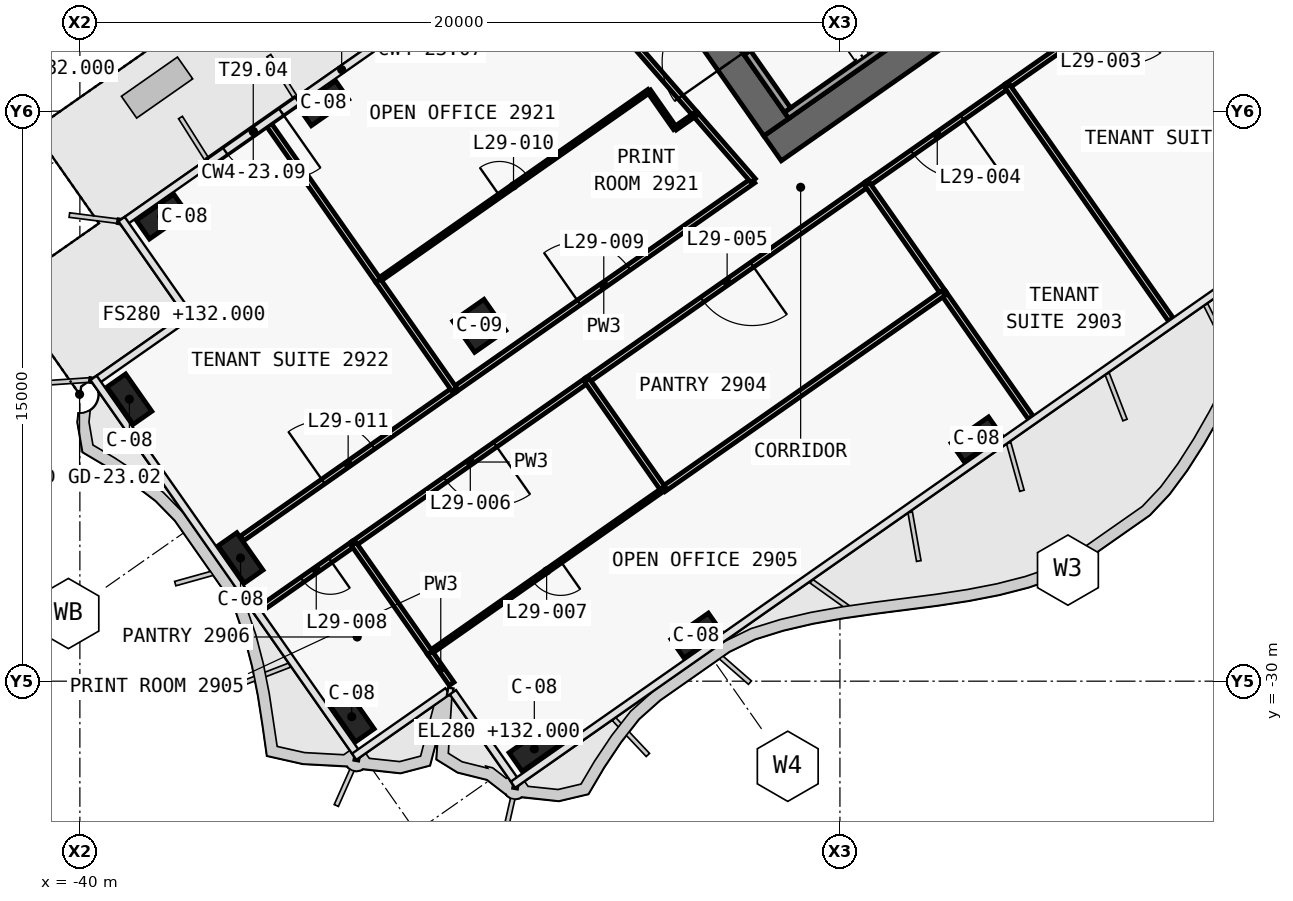
"""IFC4 building model, lengths in metres.
Left out: names, types, materials, properties, quantities, classifications, styles, units other than length and angle.
Written with IfcOpenShell. Run it as: python <this file> out.ifc"""

import sys

from ifc_helpers import new_model, si_unit, direction, frame, frame_2d, origin, origin_2d, place, context, subcontext, project, spatial, polyline, rectangle, outline, extrude, element, fill, save


model = new_model("IFC4")
c1 = context("Model", 3, precision=1e-05, world=origin(), true_north=direction((0.0, 1.0)))
c2 = subcontext(c1, "Body", "Model", "MODEL_VIEW")
j1 = project(units=[si_unit("LENGTHUNIT", "METRE"), si_unit("PLANEANGLEUNIT", "RADIAN")], contexts=[c1])
p1 = place(None, origin())
s1 = spatial("IfcSite", under=j1, at=p1, CompositionType="ELEMENT")
p2 = place(p1, origin())
s2 = spatial("IfcBuilding", under=s1, at=p2, CompositionType="ELEMENT")
p3 = place(p2, frame((0.0, 0.0, 132.0)))
s3 = spatial("IfcBuildingStorey", under=s2, at=p3, CompositionType="ELEMENT", Elevation=132.0)
p4 = place(p3, frame((0.029, -0.712, 0.0), z_axis=(0.0, 0.0, 1.0), x_axis=(-0.819151758019, -0.573576845187, 0.0)))
e1 = element("IfcWall", 1, at=p4, inside=s3, PredefinedType="SHEAR", context=c2, shape_type="SweptSolid", body=[
    extrude(outline(polyline([(26.616, 0.4), (0.56, 0.4), (-0.0, -0.4), (26.616, -0.4), (26.616, 0.4)])), origin(), (0.0, 0.0, 1.0), 3.9),
])
p5 = place(p4, frame((2.966, 0.0, 0.0)))
e2 = element("IfcOpeningElement", 2, at=p5, cuts=e1, PredefinedType="OPENING", context=c2, shape_type="SweptSolid", body=[
    extrude(rectangle(XDim=2.4, YDim=2.1, at=frame_2d((1.2, 1.05))), frame((0.0, 0.41, 0.0), z_axis=(0.0, -1.0, 0.0), x_axis=(1.0, 0.0, 0.0)), (0.0, 0.0, 1.0), 0.82),
])
p6 = place(p4, frame((11.916, 0.0, 0.0)))
e3 = element("IfcOpeningElement", 3, at=p6, cuts=e1, PredefinedType="OPENING", context=c2, shape_type="SweptSolid", body=[
    extrude(rectangle(XDim=2.4, YDim=2.1, at=frame_2d((1.2, 1.05))), frame((0.0, 0.41, 0.0), z_axis=(0.0, -1.0, 0.0), x_axis=(1.0, 0.0, 0.0)), (0.0, 0.0, 1.0), 0.82),
])
p7 = place(p3, frame((-21.675, -15.421, 0.0), z_axis=(0.0, 0.0, 1.0), x_axis=(-0.573581815061, 0.819148278049, 0.0)))
e4 = element("IfcWall", 4, at=p7, inside=s3, PredefinedType="SHEAR", context=c2, shape_type="SweptSolid", body=[
    extrude(outline(polyline([(0.0, 0.4), (0.0, -0.4), (9.6, -0.4), (9.6, 0.4), (0.0, 0.4)])), origin(), (0.0, 0.0, 1.0), 3.9),
])
p8 = place(p7, frame((6.3, 0.0, 0.0)))
e5 = element("IfcOpeningElement", 5, at=p8, cuts=e4, PredefinedType="OPENING", context=c2, shape_type="SweptSolid", body=[
    extrude(rectangle(XDim=1.8, YDim=2.1, at=frame_2d((0.9, 1.05))), frame((0.0, 0.41, 0.0), z_axis=(0.0, -1.0, 0.0), x_axis=(1.0, 0.0, 0.0)), (0.0, 0.0, 1.0), 0.82),
])
p9 = place(p7, frame((2.1, 0.0, 0.0)))
e6 = element("IfcOpeningElement", 6, at=p9, cuts=e4, PredefinedType="OPENING", context=c2, shape_type="SweptSolid", body=[
    extrude(rectangle(XDim=1.8, YDim=2.1, at=frame_2d((0.9, 1.05))), frame((0.0, 0.41, 0.0), z_axis=(0.0, -1.0, 0.0), x_axis=(1.0, 0.0, 0.0)), (0.0, 0.0, 1.0), 0.82),
])
for number, where, z_axis, x_axis in (
    (7, (-16.41, -23.637, 0.0), (0.0, 0.0, 1.0), (-0.819, -0.574, 0.0)),
    (8, (-23.782, -28.799, 0.0), (0.0, 0.0, 1.0), (-0.819, -0.574, 0.0)),
    (9, (-28.042, -31.782, 0.0), (0.0, 0.0, 1.0), (-0.819, -0.574, 0.0)),
    (10, (-33.591, -14.792, 0.0), (0.0, 0.0, 1.0), (-0.819, -0.574, 0.0)),
    (11, (-37.85, -17.774, 0.0), (0.0, 0.0, 1.0), (-0.819, -0.574, 0.0)),
    (12, (-32.847, -30.935, 0.0), (0.0, 0.0, 1.0), (-0.574, 0.819, 0.0)),
    (13, (-35.772, -26.757, 0.0), (0.0, 0.0, 1.0), (-0.574, 0.819, 0.0)),
    (14, (-38.698, -22.579, 0.0), (0.0, 0.0, 1.0), (-0.574, 0.819, 0.0)),
):
    element("IfcColumn", number, at=place(p3, frame(where, z_axis=z_axis, x_axis=x_axis)), inside=s3, PredefinedType="COLUMN", context=c2, shape_type="SweptSolid", body=[
        extrude(rectangle(XDim=1.2, YDim=0.6, at=origin_2d()), origin(), (0.0, 0.0, 1.0), 3.9),
    ])
p10 = place(p3, frame((-29.49, -20.649, 0.0), z_axis=(0.0, 0.0, 1.0), x_axis=(-0.819152044289, -0.573576436351, 0.0)))
e15 = element("IfcColumn", 15, at=p10, inside=s3, PredefinedType="COLUMN", context=c2, shape_type="SweptSolid", body=[
    extrude(rectangle(XDim=1.0, YDim=1.0, at=origin_2d()), origin(), (0.0, 0.0, 1.0), 3.9),
])
p11 = place(p3, frame((-14.851, -10.521, 0.0), z_axis=(0.0, 0.0, 1.0), x_axis=(-0.819141584393, -0.57359137434, 0.0)))
e16 = element("IfcWall", 16, at=p11, inside=s3, PredefinedType="SOLIDWALL", context=c2, shape_type="SweptSolid", body=[
    extrude(rectangle(XDim=8.0, YDim=0.2, at=frame_2d((4.0, 0.0))), origin(), (0.0, 0.0, 1.0), 3.62),
])
p12 = place(p3, frame((-21.38, -14.97, 0.0), z_axis=(0.0, 0.0, 1.0), x_axis=(-0.573559770908, 0.819163713305, 0.0)))
e17 = element("IfcWall", 17, at=p12, inside=s3, PredefinedType="SOLIDWALL", context=c2, shape_type="SweptSolid", body=[
    extrude(rectangle(XDim=1.85, YDim=0.2, at=frame_2d((0.925, 0.0))), origin(), (0.0, 0.0, 1.0), 3.62),
])
p13 = place(p3, frame((-22.441, -13.455, 2.15), z_axis=(0.0, 0.0, 1.0), x_axis=(-0.573591692345, 0.819141361715, 0.0)))
e18 = element("IfcWall", 18, at=p13, inside=s3, PredefinedType="SOLIDWALL", context=c2, shape_type="SweptSolid", body=[
    extrude(rectangle(XDim=1.9, YDim=0.2, at=frame_2d((0.95, 0.0))), origin(), (0.0, 0.0, 1.0), 1.47),
])
p14 = place(p3, frame((-34.299, -14.739, 0.0), z_axis=(0.0, 0.0, 1.0), x_axis=(-0.81917415632, -0.573544855802, 0.0)))
e19 = element("IfcWall", 19, at=p14, inside=s3, PredefinedType="SOLIDWALL", context=c2, shape_type="SweptSolid", body=[
    extrude(rectangle(XDim=2.78, YDim=0.2, at=frame_2d((1.39, 0.0))), origin(), (0.0, 0.0, 1.0), 3.62),
])
p15 = place(p14, frame((0.49, 0.0, 0.0)))
e20 = element("IfcOpeningElement", 20, at=p15, cuts=e19, PredefinedType="OPENING", context=c2, shape_type="SweptSolid", body=[
    extrude(rectangle(XDim=1.8, YDim=2.4, at=frame_2d((0.9, 1.2))), frame((0.0, 0.11, 0.0), z_axis=(0.0, -1.0, 0.0), x_axis=(1.0, 0.0, 0.0)), (0.0, 0.0, 1.0), 0.22),
])
p16 = place(p3, frame((-30.146, -22.33, 0.0), z_axis=(0.0, 0.0, 1.0), x_axis=(0.819150657747, 0.573578416533, 0.0)))
e21 = element("IfcWall", 21, at=p16, inside=s3, PredefinedType="PARTITIONING", context=c2, shape_type="SweptSolid", body=[
    extrude(rectangle(XDim=9.599, YDim=0.15, at=frame_2d((4.799, 0.0))), origin(), (0.0, 0.0, 1.0), 3.0),
])
p17 = place(p16, frame((4.0, 0.0, 0.0)))
e22 = element("IfcOpeningElement", 22, at=p17, cuts=e21, PredefinedType="OPENING", context=c2, shape_type="SweptSolid", body=[
    extrude(rectangle(XDim=1.6, YDim=2.1, at=frame_2d((0.8, 1.05))), frame((0.0, 0.085, 0.0), z_axis=(0.0, -1.0, 0.0), x_axis=(1.0, 0.0, 0.0)), (0.0, 0.0, 1.0), 0.17),
])
p18 = place(p3, frame((-35.739, -26.247, 0.0), z_axis=(0.0, 0.0, 1.0), x_axis=(0.819149650018, 0.57357985571, 0.0)))
e23 = element("IfcWall", 23, at=p18, inside=s3, PredefinedType="PARTITIONING", context=c2, shape_type="SweptSolid", body=[
    extrude(rectangle(XDim=6.832, YDim=0.15, at=frame_2d((3.416, 0.0))), origin(), (0.0, 0.0, 1.0), 3.0),
])
p19 = place(p18, frame((2.616, 0.0, 0.0)))
e24 = element("IfcOpeningElement", 24, at=p19, cuts=e23, PredefinedType="OPENING", context=c2, shape_type="SweptSolid", body=[
    extrude(rectangle(XDim=1.6, YDim=2.1, at=frame_2d((0.8, 1.05))), frame((0.0, 0.085, 0.0), z_axis=(0.0, -1.0, 0.0), x_axis=(1.0, 0.0, 0.0)), (0.0, 0.0, 1.0), 0.17),
])
p20 = place(p3, frame((-10.68, -10.896, 0.0), z_axis=(0.0, 0.0, 1.0), x_axis=(-0.819145946981, -0.573585144111, 0.0)))
e25 = element("IfcWall", 25, at=p20, inside=s3, PredefinedType="PARTITIONING", context=c2, shape_type="SweptSolid", body=[
    extrude(rectangle(XDim=6.004, YDim=0.15, at=frame_2d((3.002, 0.0))), origin(), (0.0, 0.0, 1.0), 3.0),
])
p21 = place(p20, frame((2.202, 0.0, 0.0)))
e26 = element("IfcOpeningElement", 26, at=p21, cuts=e25, PredefinedType="OPENING", context=c2, shape_type="SweptSolid", body=[
    extrude(rectangle(XDim=1.6, YDim=2.1, at=frame_2d((0.8, 1.05))), frame((0.0, 0.085, 0.0), z_axis=(0.0, -1.0, 0.0), x_axis=(1.0, 0.0, 0.0)), (0.0, 0.0, 1.0), 0.17),
])
p22 = place(p3, frame((-15.594, -14.338, 0.0), z_axis=(0.0, 0.0, 1.0), x_axis=(-0.819165703328, -0.573556928727, 0.0)))
e27 = element("IfcWall", 27, at=p22, inside=s3, PredefinedType="PARTITIONING", context=c2, shape_type="SweptSolid", body=[
    extrude(rectangle(XDim=4.504, YDim=0.15, at=frame_2d((2.252, 0.0))), origin(), (0.0, 0.0, 1.0), 3.62),
])
p23 = place(p22, frame((1.452, 0.0, 0.0)))
e28 = element("IfcOpeningElement", 28, at=p23, cuts=e27, PredefinedType="OPENING", context=c2, shape_type="SweptSolid", body=[
    extrude(rectangle(XDim=1.6, YDim=2.1, at=frame_2d((0.8, 1.05))), frame((0.0, 0.085, 0.0), z_axis=(0.0, -1.0, 0.0), x_axis=(1.0, 0.0, 0.0)), (0.0, 0.0, 1.0), 0.17),
])
p24 = place(p3, frame((-19.281, -16.919, 0.0), z_axis=(0.0, 0.0, 1.0), x_axis=(-0.819151661297, -0.57357698332, 0.0)))
e29 = element("IfcWall", 29, at=p24, inside=s3, PredefinedType="PARTITIONING", context=c2, shape_type="SweptSolid", body=[
    extrude(rectangle(XDim=9.004, YDim=0.15, at=frame_2d((4.502, 0.0))), origin(), (0.0, 0.0, 1.0), 3.0),
])
p25 = place(p24, frame((3.702, 0.0, 0.0)))
e30 = element("IfcOpeningElement", 30, at=p25, cuts=e29, PredefinedType="OPENING", context=c2, shape_type="SweptSolid", body=[
    extrude(rectangle(XDim=1.6, YDim=2.1, at=frame_2d((0.8, 1.05))), frame((0.0, 0.085, 0.0), z_axis=(0.0, -1.0, 0.0), x_axis=(1.0, 0.0, 0.0)), (0.0, 0.0, 1.0), 0.17),
])
p26 = place(p3, frame((-26.653, -22.081, 0.0), z_axis=(0.0, 0.0, 1.0), x_axis=(-0.819149375276, -0.573580248078, 0.0)))
e31 = element("IfcWall", 31, at=p26, inside=s3, PredefinedType="PARTITIONING", context=c2, shape_type="SweptSolid", body=[
    extrude(rectangle(XDim=7.504, YDim=0.15, at=frame_2d((3.752, 0.0))), origin(), (0.0, 0.0, 1.0), 3.0),
])
p27 = place(p26, frame((2.952, 0.0, 0.0)))
e32 = element("IfcOpeningElement", 32, at=p27, cuts=e31, PredefinedType="OPENING", context=c2, shape_type="SweptSolid", body=[
    extrude(rectangle(XDim=1.6, YDim=2.1, at=frame_2d((0.8, 1.05))), frame((0.0, 0.085, 0.0), z_axis=(0.0, -1.0, 0.0), x_axis=(1.0, 0.0, 0.0)), (0.0, 0.0, 1.0), 0.17),
])
p28 = place(p3, frame((-32.797, -26.383, 0.0), z_axis=(0.0, 0.0, 1.0), x_axis=(-0.819197532854, -0.573511466464, 0.0)))
e33 = element("IfcWall", 33, at=p28, inside=s3, PredefinedType="PARTITIONING", context=c2, shape_type="SweptSolid", body=[
    extrude(rectangle(XDim=3.002, YDim=0.15, at=frame_2d((1.501, 0.0))), origin(), (0.0, 0.0, 1.0), 2.9),
])
p29 = place(p28, frame((0.751, 0.0, 0.0)))
e34 = element("IfcOpeningElement", 34, at=p29, cuts=e33, PredefinedType="OPENING", context=c2, shape_type="SweptSolid", body=[
    extrude(rectangle(XDim=0.9, YDim=2.1, at=frame_2d((0.45, 1.05))), frame((0.0, 0.085, 0.0), z_axis=(0.0, -1.0, 0.0), x_axis=(1.0, 0.0, 0.0)), (0.0, 0.0, 1.0), 0.17),
])
p30 = place(p3, frame((-23.802, -15.082, 0.0), z_axis=(0.0, 0.0, 1.0), x_axis=(-0.656784983898, 0.754077903751, 0.0)))
e35 = element("IfcWall", 35, at=p30, inside=s3, PredefinedType="PARTITIONING", context=c2, shape_type="SweptSolid", body=[
    extrude(rectangle(XDim=4.226, YDim=0.15, at=frame_2d((2.113, 0.0))), origin(), (0.0, 0.0, 1.0), 3.62),
])
p31 = place(p3, frame((-22.284, -16.826, 0.0), z_axis=(0.0, 0.0, 1.0), x_axis=(-0.656749820099, 0.754108529192, 0.0)))
e36 = element("IfcWall", 36, at=p31, inside=s3, PredefinedType="PARTITIONING", context=c2, shape_type="SweptSolid", body=[
    extrude(rectangle(XDim=2.317, YDim=0.15, at=frame_2d((1.159, 0.0))), origin(), (0.0, 0.0, 1.0), 3.0),
])
p32 = place(p3, frame((-24.337, -15.454, 0.0), z_axis=(0.0, 0.0, 1.0), x_axis=(0.819196675611, 0.573512690938, 0.0)))
e37 = element("IfcWall", 37, at=p32, inside=s3, PredefinedType="PARTITIONING", context=c2, shape_type="SweptSolid", body=[
    extrude(rectangle(XDim=0.651, YDim=0.1, at=frame_2d((0.325, 0.0))), origin(), (0.0, 0.0, 1.0), 3.62),
])
p33 = place(p3, frame((-25.026, -14.47, 0.0), z_axis=(0.0, 0.0, 1.0), x_axis=(0.57359875229, -0.819136418047, 0.0)))
e38 = element("IfcWall", 38, at=p33, inside=s3, PredefinedType="PARTITIONING", context=c2, shape_type="SweptSolid", body=[
    extrude(rectangle(XDim=1.201, YDim=0.1, at=frame_2d((0.601, 0.0))), origin(), (0.0, 0.0, 1.0), 3.62),
])
p34 = place(p3, frame((-32.153, -19.46, 0.0), z_axis=(0.0, 0.0, 1.0), x_axis=(0.819139624372, 0.573594173421, 0.0)))
e39 = element("IfcWall", 39, at=p34, inside=s3, PredefinedType="PARTITIONING", context=c2, shape_type="SweptSolid", body=[
    extrude(rectangle(XDim=8.7, YDim=0.1, at=frame_2d((4.35, 0.0))), origin(), (0.0, 0.0, 1.0), 3.0),
])
p35 = place(p34, frame((3.9, 0.0, 0.0)))
e40 = element("IfcOpeningElement", 40, at=p35, cuts=e39, PredefinedType="OPENING", context=c2, shape_type="SweptSolid", body=[
    extrude(rectangle(XDim=0.9, YDim=2.1, at=frame_2d((0.45, 1.05))), frame((0.0, 0.06, 0.0), z_axis=(0.0, -1.0, 0.0), x_axis=(1.0, 0.0, 0.0)), (0.0, 0.0, 1.0), 0.12),
])
p36 = place(p3, frame((-32.153, -19.46, 0.0), z_axis=(0.0, 0.0, 1.0), x_axis=(-0.573590165683, 0.819142430736, 0.0)))
e41 = element("IfcWall", 41, at=p36, inside=s3, PredefinedType="PARTITIONING", context=c2, shape_type="SweptSolid", body=[
    extrude(rectangle(XDim=4.999, YDim=0.15, at=frame_2d((2.5, 0.0))), origin(), (0.0, 0.0, 1.0), 2.9),
])
p37 = place(p3, frame((-30.145, -22.328, 0.0), z_axis=(0.0, 0.0, 1.0), x_axis=(-0.573565328398, 0.819159822049, 0.0)))
e42 = element("IfcWall", 42, at=p37, inside=s3, PredefinedType="PARTITIONING", context=c2, shape_type="SweptSolid", body=[
    extrude(rectangle(XDim=3.5, YDim=0.15, at=frame_2d((1.75, 0.0))), origin(), (0.0, 0.0, 1.0), 3.0),
])
p38 = place(p3, frame((-8.674, -13.764, 0.0), z_axis=(0.0, 0.0, 1.0), x_axis=(-0.573612130335, 0.819127049933, 0.0)))
e43 = element("IfcWall", 43, at=p38, inside=s3, PredefinedType="PARTITIONING", context=c2, shape_type="SweptSolid", body=[
    extrude(rectangle(XDim=3.5, YDim=0.15, at=frame_2d((1.75, 0.0))), origin(), (0.0, 0.0, 1.0), 3.62),
])
p39 = place(p3, frame((-11.294, -20.482, 0.0), z_axis=(0.0, 0.0, 1.0), x_axis=(-0.573560650686, 0.819163097304, 0.0)))
e44 = element("IfcWall", 44, at=p39, inside=s3, PredefinedType="PARTITIONING", context=c2, shape_type="SweptSolid", body=[
    extrude(rectangle(XDim=7.5, YDim=0.15, at=frame_2d((3.75, 0.0))), origin(), (0.0, 0.0, 1.0), 2.9),
])
p40 = place(p3, frame((-17.274, -19.789, 0.0), z_axis=(0.0, 0.0, 1.0), x_axis=(-0.573602698703, 0.819133654565, 0.0)))
e45 = element("IfcWall", 45, at=p40, inside=s3, PredefinedType="PARTITIONING", context=c2, shape_type="SweptSolid", body=[
    extrude(rectangle(XDim=3.502, YDim=0.15, at=frame_2d((1.751, 0.0))), origin(), (0.0, 0.0, 1.0), 3.62),
])
p41 = place(p3, frame((-14.98, -23.063, 0.0), z_axis=(0.0, 0.0, 1.0), x_axis=(-0.57356471828, 0.819160249246, 0.0)))
e46 = element("IfcWall", 46, at=p41, inside=s3, PredefinedType="PARTITIONING", context=c2, shape_type="SweptSolid", body=[
    extrude(rectangle(XDim=4.001, YDim=0.15, at=frame_2d((2.0, 0.0))), origin(), (0.0, 0.0, 1.0), 2.9),
])
p42 = place(p3, frame((-17.275, -19.787, 0.0), z_axis=(0.0, 0.0, 1.0), x_axis=(-0.819154173185, -0.573573395961, 0.0)))
e47 = element("IfcWall", 47, at=p42, inside=s3, PredefinedType="PARTITIONING", context=c2, shape_type="SweptSolid", body=[
    extrude(rectangle(XDim=9.0, YDim=0.15, at=frame_2d((4.5, 0.0))), origin(), (0.0, 0.0, 1.0), 3.0),
])
p43 = place(p3, frame((-24.647, -24.949, 0.0), z_axis=(0.0, 0.0, 1.0), x_axis=(-0.573598101901, 0.81913687348, 0.0)))
e48 = element("IfcWall", 48, at=p43, inside=s3, PredefinedType="PARTITIONING", context=c2, shape_type="SweptSolid", body=[
    extrude(rectangle(XDim=3.5, YDim=0.15, at=frame_2d((1.75, 0.0))), origin(), (0.0, 0.0, 1.0), 3.62),
])
p44 = place(p3, frame((-24.646, -24.95, 0.0), z_axis=(0.0, 0.0, 1.0), x_axis=(-0.819163097304, -0.573560650686, 0.0)))
e49 = element("IfcWall", 49, at=p44, inside=s3, PredefinedType="PARTITIONING", context=c2, shape_type="SweptSolid", body=[
    extrude(rectangle(XDim=7.5, YDim=0.1, at=frame_2d((3.75, 0.0))), origin(), (0.0, 0.0, 1.0), 3.0),
])
p45 = place(p44, frame((3.3, 0.0, 0.0)))
e50 = element("IfcOpeningElement", 50, at=p45, cuts=e49, PredefinedType="OPENING", context=c2, shape_type="SweptSolid", body=[
    extrude(rectangle(XDim=0.9, YDim=2.1, at=frame_2d((0.45, 1.05))), frame((0.0, 0.06, 0.0), z_axis=(0.0, -1.0, 0.0), x_axis=(1.0, 0.0, 0.0)), (0.0, 0.0, 1.0), 0.12),
])
p46 = place(p3, frame((-30.217, -30.07, 0.0), z_axis=(0.0, 0.0, 1.0), x_axis=(-0.573560748432, 0.819163028864, 0.0)))
e51 = element("IfcWall", 51, at=p46, inside=s3, PredefinedType="PARTITIONING", context=c2, shape_type="SweptSolid", body=[
    extrude(rectangle(XDim=0.999, YDim=0.15, at=frame_2d((0.5, 0.0))), origin(), (0.0, 0.0, 1.0), 3.62),
])
p47 = place(p3, frame((-30.791, -29.251, 0.0), z_axis=(0.0, 0.0, 1.0), x_axis=(-0.573518520844, 0.819192594113, 0.0)))
e52 = element("IfcWall", 52, at=p47, inside=s3, PredefinedType="PARTITIONING", context=c2, shape_type="SweptSolid", body=[
    extrude(rectangle(XDim=3.5, YDim=0.15, at=frame_2d((1.75, 0.0))), origin(), (0.0, 0.0, 1.0), 3.62),
])
p48 = place(p9, origin())
e53 = element("IfcDoor", 53, at=p48, inside=s3, OperationType="DOUBLE_DOOR_SINGLE_SWING", PredefinedType="DOOR", context=c2, shape_type="SweptSolid", body=[
    extrude(rectangle(XDim=1.8, YDim=2.1, at=frame_2d((0.9, 1.05))), frame((0.0, 0.025, 0.0), z_axis=(0.0, -1.0, 0.0), x_axis=(1.0, 0.0, 0.0)), (0.0, 0.0, 1.0), 0.05),
])
fill(e6, e53)
p49 = place(p15, origin())
e54 = element("IfcDoor", 54, at=p49, inside=s3, OperationType="DOUBLE_DOOR_DOUBLE_SWING", PredefinedType="DOOR", context=c2, shape_type="SweptSolid", body=[
    extrude(rectangle(XDim=1.8, YDim=2.4, at=frame_2d((0.9, 1.2))), frame((0.0, 0.025, 0.0), z_axis=(0.0, -1.0, 0.0), x_axis=(1.0, 0.0, 0.0)), (0.0, 0.0, 1.0), 0.05),
])
fill(e20, e54)
p50 = place(p23, origin())
e55 = element("IfcDoor", 55, at=p50, inside=s3, OperationType="DOUBLE_DOOR_SINGLE_SWING", PredefinedType="DOOR", context=c2, shape_type="SweptSolid", body=[
    extrude(rectangle(XDim=1.6, YDim=2.1, at=frame_2d((0.8, 1.05))), frame((0.0, 0.025, 0.0), z_axis=(0.0, -1.0, 0.0), x_axis=(1.0, 0.0, 0.0)), (0.0, 0.0, 1.0), 0.05),
])
fill(e28, e55)
p51 = place(p25, origin())
e56 = element("IfcDoor", 56, at=p51, inside=s3, OperationType="DOUBLE_DOOR_SINGLE_SWING", PredefinedType="DOOR", context=c2, shape_type="SweptSolid", body=[
    extrude(rectangle(XDim=1.6, YDim=2.1, at=frame_2d((0.8, 1.05))), frame((0.0, 0.025, 0.0), z_axis=(0.0, -1.0, 0.0), x_axis=(1.0, 0.0, 0.0)), (0.0, 0.0, 1.0), 0.05),
])
fill(e30, e56)
p52 = place(p27, origin())
e57 = element("IfcDoor", 57, at=p52, inside=s3, OperationType="DOUBLE_DOOR_SINGLE_SWING", PredefinedType="DOOR", context=c2, shape_type="SweptSolid", body=[
    extrude(rectangle(XDim=1.6, YDim=2.1, at=frame_2d((0.8, 1.05))), frame((0.0, 0.025, 0.0), z_axis=(0.0, -1.0, 0.0), x_axis=(1.0, 0.0, 0.0)), (0.0, 0.0, 1.0), 0.05),
])
fill(e32, e57)
p53 = place(p45, origin())
e58 = element("IfcDoor", 58, at=p53, inside=s3, OperationType="SINGLE_SWING_LEFT", PredefinedType="DOOR", context=c2, shape_type="SweptSolid", body=[
    extrude(rectangle(XDim=0.9, YDim=2.1, at=frame_2d((0.45, 1.05))), frame((0.0, 0.025, 0.0), z_axis=(0.0, -1.0, 0.0), x_axis=(1.0, 0.0, 0.0)), (0.0, 0.0, 1.0), 0.05),
])
fill(e50, e58)
p54 = place(p29, origin())
e59 = element("IfcDoor", 59, at=p54, inside=s3, OperationType="SINGLE_SWING_RIGHT", PredefinedType="DOOR", context=c2, shape_type="SweptSolid", body=[
    extrude(rectangle(XDim=0.9, YDim=2.1, at=frame_2d((0.45, 1.05))), frame((0.0, 0.025, 0.0), z_axis=(0.0, -1.0, 0.0), x_axis=(1.0, 0.0, 0.0)), (0.0, 0.0, 1.0), 0.05),
])
fill(e34, e59)
p55 = place(p17, origin())
e60 = element("IfcDoor", 60, at=p55, inside=s3, OperationType="DOUBLE_DOOR_SINGLE_SWING", PredefinedType="DOOR", context=c2, shape_type="SweptSolid", body=[
    extrude(rectangle(XDim=1.6, YDim=2.1, at=frame_2d((0.8, 1.05))), frame((0.0, 0.025, 0.0), z_axis=(0.0, -1.0, 0.0), x_axis=(1.0, 0.0, 0.0)), (0.0, 0.0, 1.0), 0.05),
])
fill(e22, e60)
p56 = place(p35, origin())
e61 = element("IfcDoor", 61, at=p56, inside=s3, OperationType="SINGLE_SWING_RIGHT", PredefinedType="DOOR", context=c2, shape_type="SweptSolid", body=[
    extrude(rectangle(XDim=0.9, YDim=2.1, at=frame_2d((0.45, 1.05))), frame((0.0, 0.025, 0.0), z_axis=(0.0, -1.0, 0.0), x_axis=(1.0, 0.0, 0.0)), (0.0, 0.0, 1.0), 0.05),
])
fill(e40, e61)
p57 = place(p19, origin())
e62 = element("IfcDoor", 62, at=p57, inside=s3, OperationType="DOUBLE_DOOR_SINGLE_SWING", PredefinedType="DOOR", context=c2, shape_type="SweptSolid", body=[
    extrude(rectangle(XDim=1.6, YDim=2.1, at=frame_2d((0.8, 1.05))), frame((0.0, 0.025, 0.0), z_axis=(0.0, -1.0, 0.0), x_axis=(1.0, 0.0, 0.0)), (0.0, 0.0, 1.0), 0.05),
])
fill(e24, e62)
save(model, sys.argv[1])
